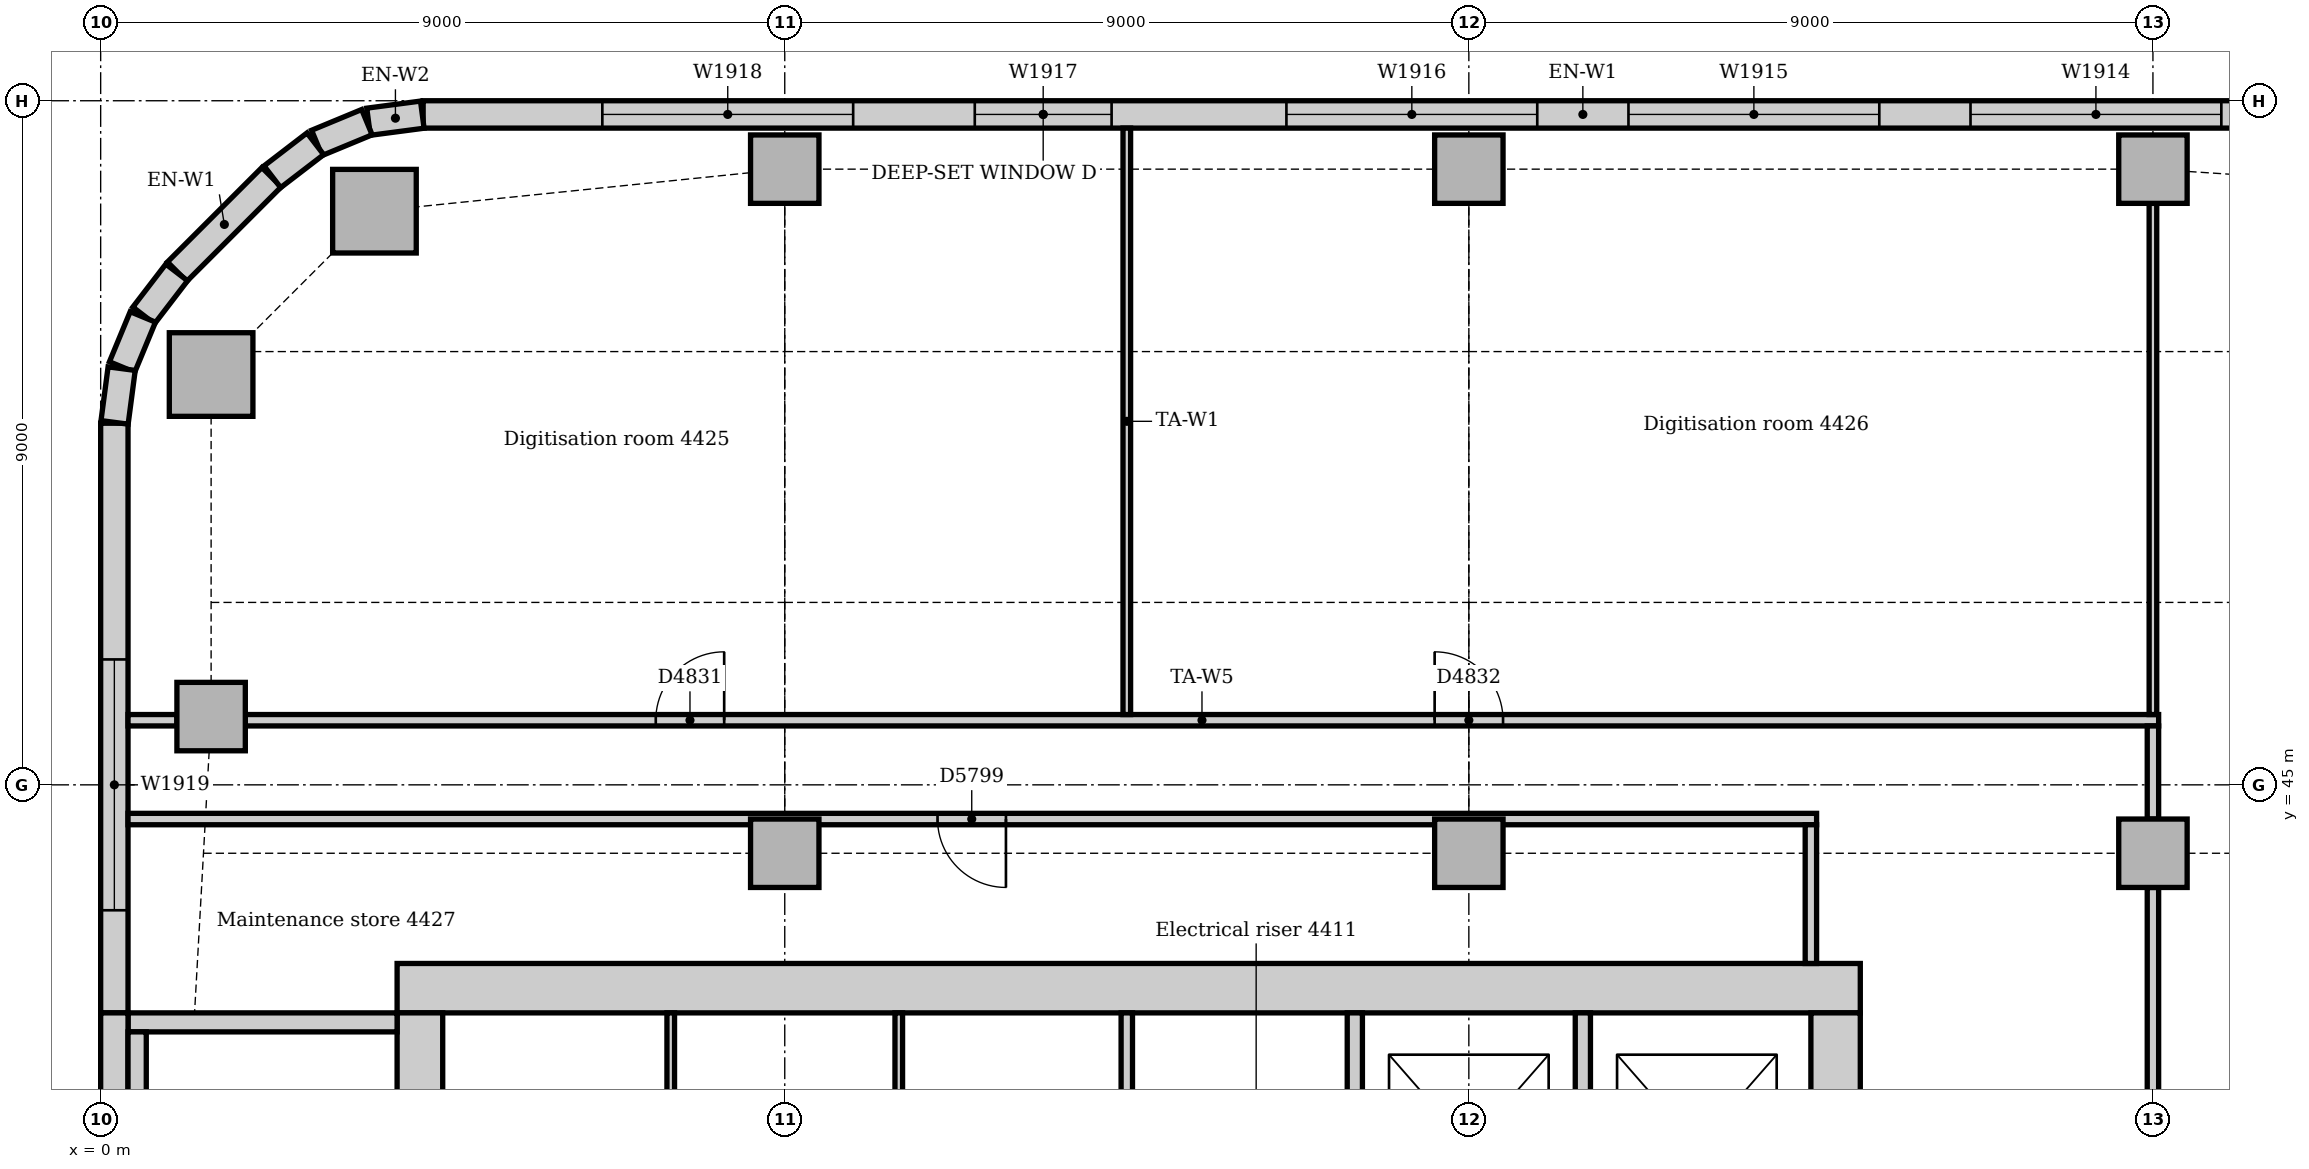
"""IFC4 building model, lengths in metres.
Left out: names, types, materials, properties, quantities, classifications, styles, units other than length and angle.
Written with IfcOpenShell. Run it as: python <this file> out.ifc"""

import sys

from ifc_helpers import new_model, si_unit, direction, frame, frame_2d, origin, origin_2d, place, context, subcontext, project, spatial, rectangle, extrude, element, fill, save


model = new_model("IFC4")
c1 = context("Model", 3, precision=1e-05, world=origin(), true_north=direction((0.0, 1.0)))
c2 = subcontext(c1, "Body", "Model", "MODEL_VIEW")
j1 = project(units=[si_unit("LENGTHUNIT", "METRE"), si_unit("PLANEANGLEUNIT", "RADIAN")], contexts=[c1])
p1 = place(None, origin())
s1 = spatial("IfcSite", under=j1, at=p1, CompositionType="ELEMENT")
p2 = place(p1, origin())
s2 = spatial("IfcBuilding", under=s1, at=p2, CompositionType="ELEMENT")
p3 = place(p2, frame((0.0, 0.0, 185.0)))
s3 = spatial("IfcBuildingStorey", under=s2, at=p3, CompositionType="ELEMENT", Elevation=185.0)
p4 = place(p3, frame((23.15, 42.325, 0.0), z_axis=(0.0, 0.0, 1.0), x_axis=(-1.0, 0.0, 0.0)))
e1 = element("IfcWall", 1, at=p4, inside=s3, PredefinedType="SOLIDWALL", context=c2, shape_type="SweptSolid", body=[
    extrude(rectangle(XDim=19.25, YDim=0.65, at=frame_2d((9.625, 0.0))), origin(), (0.0, 0.0, 1.0), 4.0),
])
p5 = place(p3, frame((22.825, 31.5, 0.0), z_axis=(0.0, 0.0, 1.0), x_axis=(0.0, 1.0, 0.0)))
e2 = element("IfcWall", 2, at=p5, inside=s3, PredefinedType="SOLIDWALL", context=c2, shape_type="SweptSolid", body=[
    extrude(rectangle(XDim=10.5, YDim=0.65, at=frame_2d((5.25, 0.0))), origin(), (0.0, 0.0, 1.0), 4.0),
])
p6 = place(p5, frame((3.15, 0.0, 0.0)))
e3 = element("IfcOpeningElement", 3, at=p6, cuts=e2, PredefinedType="OPENING", context=c2, shape_type="SweptSolid", body=[
    extrude(rectangle(XDim=1.0, YDim=2.1, at=frame_2d((0.5, 1.05))), frame((0.0, 0.335, 0.0), z_axis=(0.0, -1.0, 0.0), x_axis=(1.0, 0.0, 0.0)), (0.0, 0.0, 1.0), 0.67),
])
p7 = place(p5, frame((5.2, 0.0, 0.0)))
e4 = element("IfcOpeningElement", 4, at=p7, cuts=e2, PredefinedType="OPENING", context=c2, shape_type="SweptSolid", body=[
    extrude(rectangle(XDim=1.0, YDim=2.1, at=frame_2d((0.5, 1.05))), frame((0.0, 0.335, 0.0), z_axis=(0.0, -1.0, 0.0), x_axis=(1.0, 0.0, 0.0)), (0.0, 0.0, 1.0), 0.67),
])
p8 = place(p3, frame((4.2, 42.0, 0.0), z_axis=(0.0, 0.0, 1.0), x_axis=(0.0, -1.0, 0.0)))
e5 = element("IfcWall", 5, at=p8, inside=s3, PredefinedType="SOLIDWALL", context=c2, shape_type="SweptSolid", body=[
    extrude(rectangle(XDim=10.5, YDim=0.6, at=frame_2d((5.25, 0.0))), origin(), (0.0, 0.0, 1.0), 4.0),
])
p9 = place(p8, frame((5.3, 0.0, 0.0)))
e6 = element("IfcOpeningElement", 6, at=p9, cuts=e5, PredefinedType="OPENING", context=c2, shape_type="SweptSolid", body=[
    extrude(rectangle(XDim=1.0, YDim=2.1, at=frame_2d((0.5, 1.05))), frame((0.0, 0.31, 0.0), z_axis=(0.0, -1.0, 0.0), x_axis=(1.0, 0.0, 0.0)), (0.0, 0.0, 1.0), 0.62),
])
p10 = place(p3, frame((3.9, 41.875, 0.0), z_axis=(0.0, 0.0, 1.0), x_axis=(-1.0, 0.0, 0.0)))
e7 = element("IfcWall", 7, at=p10, inside=s3, PredefinedType="SOLIDWALL", context=c2, shape_type="SweptSolid", body=[
    extrude(rectangle(XDim=3.54, YDim=0.25, at=frame_2d((1.77, 0.0))), origin(), (0.0, 0.0, 1.0), 4.0),
])
for number, where, z_axis, x_axis in (
    (8, (3.602, 52.547, 0.0), (0.0, 0.0, 1.0), (1.0, 0.0, 0.0)),
    (9, (1.453, 50.398, 0.0), (0.0, 0.0, 1.0), (1.0, 0.0, 0.0)),
):
    element("IfcColumn", number, at=place(p3, frame(where, z_axis=z_axis, x_axis=x_axis)), inside=s3, PredefinedType="COLUMN", context=c2, shape_type="SweptSolid", body=[
        extrude(rectangle(XDim=1.1, YDim=1.1, at=origin_2d()), origin(), (0.0, 0.0, 1.0), 3.85),
    ])
for number, where, z_axis, x_axis in (
    (10, (9.0, 53.1, 0.0), (0.0, 0.0, 1.0), (1.0, 0.0, 0.0)),
    (11, (18.0, 53.1, 0.0), (0.0, 0.0, 1.0), (1.0, 0.0, 0.0)),
    (12, (27.0, 53.1, 0.0), (0.0, 0.0, 1.0), (1.0, 0.0, 0.0)),
    (13, (1.453, 45.898, 0.0), (0.0, 0.0, 1.0), (1.0, 0.0, 0.0)),
    (14, (9.0, 44.1, 0.0), (0.0, 0.0, 1.0), (1.0, 0.0, 0.0)),
    (15, (18.0, 44.1, 0.0), (0.0, 0.0, 1.0), (1.0, 0.0, 0.0)),
    (16, (27.0, 44.1, 0.0), (0.0, 0.0, 1.0), (1.0, 0.0, 0.0)),
):
    element("IfcColumn", number, at=place(p3, frame(where, z_axis=z_axis, x_axis=x_axis)), inside=s3, PredefinedType="COLUMN", context=c2, shape_type="SweptSolid", body=[
        extrude(rectangle(XDim=0.9, YDim=0.9, at=origin_2d()), origin(), (0.0, 0.0, 1.0), 3.85),
    ])
p11 = place(p3, frame((34.757, 53.82, 0.0), z_axis=(0.0, 0.0, 1.0), x_axis=(-1.0, 0.0, 0.0)))
e17 = element("IfcWall", 17, at=p11, inside=s3, PredefinedType="STANDARD", context=c2, shape_type="SweptSolid", body=[
    extrude(rectangle(XDim=30.515, YDim=0.36, at=frame_2d((15.257, 0.0))), origin(), (0.0, 0.0, 1.0), 3.85),
])
p12 = place(p11, frame((2.357, 0.0, 0.9)))
e18 = element("IfcOpeningElement", 18, at=p12, cuts=e17, PredefinedType="OPENING", context=c2, shape_type="SweptSolid", body=[
    extrude(rectangle(XDim=3.3, YDim=1.6, at=frame_2d((1.65, 0.8))), frame((0.0, 0.19, 0.0), z_axis=(0.0, -1.0, 0.0), x_axis=(1.0, 0.0, 0.0)), (0.0, 0.0, 1.0), 0.38),
])
p13 = place(p11, frame((6.857, 0.0, 0.9)))
e19 = element("IfcOpeningElement", 19, at=p13, cuts=e17, PredefinedType="OPENING", context=c2, shape_type="SweptSolid", body=[
    extrude(rectangle(XDim=3.3, YDim=1.6, at=frame_2d((1.65, 0.8))), frame((0.0, 0.19, 0.0), z_axis=(0.0, -1.0, 0.0), x_axis=(1.0, 0.0, 0.0)), (0.0, 0.0, 1.0), 0.38),
])
p14 = place(p11, frame((11.357, 0.0, 0.9)))
e20 = element("IfcOpeningElement", 20, at=p14, cuts=e17, PredefinedType="OPENING", context=c2, shape_type="SweptSolid", body=[
    extrude(rectangle(XDim=3.3, YDim=1.6, at=frame_2d((1.65, 0.8))), frame((0.0, 0.19, 0.0), z_axis=(0.0, -1.0, 0.0), x_axis=(1.0, 0.0, 0.0)), (0.0, 0.0, 1.0), 0.38),
])
p15 = place(p11, frame((15.857, 0.0, 0.9)))
e21 = element("IfcOpeningElement", 21, at=p15, cuts=e17, PredefinedType="OPENING", context=c2, shape_type="SweptSolid", body=[
    extrude(rectangle(XDim=3.3, YDim=1.6, at=frame_2d((1.65, 0.8))), frame((0.0, 0.19, 0.0), z_axis=(0.0, -1.0, 0.0), x_axis=(1.0, 0.0, 0.0)), (0.0, 0.0, 1.0), 0.38),
])
p16 = place(p11, frame((21.457, 0.0, 0.9)))
e22 = element("IfcOpeningElement", 22, at=p16, cuts=e17, PredefinedType="OPENING", context=c2, shape_type="SweptSolid", body=[
    extrude(rectangle(XDim=1.8, YDim=1.6, at=frame_2d((0.9, 0.8))), frame((0.0, 0.19, 0.0), z_axis=(0.0, -1.0, 0.0), x_axis=(1.0, 0.0, 0.0)), (0.0, 0.0, 1.0), 0.38),
])
p17 = place(p11, frame((24.857, 0.0, 0.9)))
e23 = element("IfcOpeningElement", 23, at=p17, cuts=e17, PredefinedType="OPENING", context=c2, shape_type="SweptSolid", body=[
    extrude(rectangle(XDim=3.3, YDim=1.6, at=frame_2d((1.65, 0.8))), frame((0.0, 0.19, 0.0), z_axis=(0.0, -1.0, 0.0), x_axis=(1.0, 0.0, 0.0)), (0.0, 0.0, 1.0), 0.38),
])
p18 = place(p3, frame((2.249, 52.994, 0.0), z_axis=(0.0, 0.0, 1.0), x_axis=(-0.707106781187, -0.707106781187, 0.0)))
e24 = element("IfcWall", 24, at=p18, inside=s3, PredefinedType="STANDARD", context=c2, shape_type="SweptSolid", body=[
    extrude(rectangle(XDim=1.757, YDim=0.36, at=frame_2d((0.879, 0.0))), origin(), (0.0, 0.0, 1.0), 3.85),
])
p19 = place(p3, frame((0.18, 49.757, 0.0), z_axis=(0.0, 0.0, 1.0), x_axis=(0.0, -1.0, 0.0)))
e25 = element("IfcWall", 25, at=p19, inside=s3, PredefinedType="STANDARD", context=c2, shape_type="SweptSolid", body=[
    extrude(rectangle(XDim=7.757, YDim=0.36, at=frame_2d((3.879, 0.0))), origin(), (0.0, 0.0, 1.0), 3.85),
])
p20 = place(p19, frame((3.107, 0.0, 0.9)))
e26 = element("IfcOpeningElement", 26, at=p20, cuts=e25, PredefinedType="OPENING", context=c2, shape_type="SweptSolid", body=[
    extrude(rectangle(XDim=3.3, YDim=1.6, at=frame_2d((1.65, 0.8))), frame((0.0, 0.19, 0.0), z_axis=(0.0, -1.0, 0.0), x_axis=(1.0, 0.0, 0.0)), (0.0, 0.0, 1.0), 0.38),
])
p21 = place(p3, frame((0.18, 42.0, 0.0), z_axis=(0.0, 0.0, 1.0), x_axis=(0.0, -1.0, 0.0)))
e27 = element("IfcWall", 27, at=p21, inside=s3, PredefinedType="STANDARD", context=c2, shape_type="SweptSolid", body=[
    extrude(rectangle(XDim=6.75, YDim=0.36, at=frame_2d((3.375, 0.0))), origin(), (0.0, 0.0, 1.0), 3.85),
])
for number, where, z_axis, x_axis in (
    (28, (4.231, 53.817, 0.0), (0.0, 0.0, 1.0), (-0.991, -0.131, 0.0)),
    (29, (3.503, 53.718, 0.0), (0.0, 0.0, 1.0), (-0.924, -0.383, 0.0)),
):
    element("IfcWall", number, at=place(p3, frame(where, z_axis=z_axis, x_axis=x_axis)), inside=s3, PredefinedType="STANDARD", context=c2, shape_type="SweptSolid", body=[
        extrude(rectangle(XDim=0.713, YDim=0.36, at=frame_2d((0.356, 0.0))), origin(), (0.0, 0.0, 1.0), 3.85),
    ])
for number, where, z_axis, x_axis in (
    (30, (2.825, 53.434, 0.0), (0.0, 0.0, 1.0), (-0.793, -0.609, 0.0)),
    (31, (1.0, 51.741, 0.0), (0.0, 0.0, 1.0), (-0.609, -0.793, 0.0)),
):
    element("IfcWall", number, at=place(p3, frame(where, z_axis=z_axis, x_axis=x_axis)), inside=s3, PredefinedType="STANDARD", context=c2, shape_type="SweptSolid", body=[
        extrude(rectangle(XDim=0.713, YDim=0.36, at=frame_2d((0.357, 0.0))), origin(), (0.0, 0.0, 1.0), 3.85),
    ])
for number, where, z_axis, x_axis in (
    (32, (0.555, 51.156, 0.0), (0.0, 0.0, 1.0), (-0.383, -0.924, 0.0)),
    (33, (0.276, 50.476, 0.0), (0.0, 0.0, 1.0), (-0.131, -0.991, 0.0)),
):
    element("IfcWall", number, at=place(p3, frame(where, z_axis=z_axis, x_axis=x_axis)), inside=s3, PredefinedType="STANDARD", context=c2, shape_type="SweptSolid", body=[
        extrude(rectangle(XDim=0.713, YDim=0.36, at=frame_2d((0.356, 0.0))), origin(), (0.0, 0.0, 1.0), 3.85),
    ])
p22 = place(p3, frame((0.48, 40.13, 0.0), z_axis=(0.0, 0.0, 1.0), x_axis=(0.0, 1.0, 0.0)))
e34 = element("IfcWall", 34, at=p22, inside=s3, PredefinedType="STANDARD", context=c2, shape_type="SweptSolid", body=[
    extrude(rectangle(XDim=1.62, YDim=0.24, at=frame_2d((0.81, 0.0))), origin(), (0.0, 0.0, 1.0), 4.0),
])
for number, where, z_axis, x_axis in (
    (35, (16.5, 38.6, 0.0), (0.0, 0.0, 1.0), (0.0, 1.0, 0.0)),
    (36, (19.5, 38.6, 0.0), (0.0, 0.0, 1.0), (0.0, 1.0, 0.0)),
):
    element("IfcWall", number, at=place(p3, frame(where, z_axis=z_axis, x_axis=x_axis)), inside=s3, PredefinedType="PARTITIONING", context=c2, shape_type="SweptSolid", body=[
        extrude(rectangle(XDim=3.4, YDim=0.2, at=frame_2d((1.7, 0.0))), origin(), (0.0, 0.0, 1.0), 3.85),
    ])
p23 = place(p3, frame((1.903, 45.85, 0.0), z_axis=(0.0, 0.0, 1.0), x_axis=(1.0, 0.0, 0.0)))
e37 = element("IfcWall", 37, at=p23, inside=s3, PredefinedType="PARTITIONING", context=c2, shape_type="SweptSolid", body=[
    extrude(rectangle(XDim=25.172, YDim=0.15, at=frame_2d((12.586, 0.0))), origin(), (0.0, 0.0, 1.0), 3.85),
])
p24 = place(p23, frame((5.4, 0.0, 0.0)))
e38 = element("IfcOpeningElement", 38, at=p24, cuts=e37, PredefinedType="OPENING", context=c2, shape_type="SweptSolid", body=[
    extrude(rectangle(XDim=0.9, YDim=2.1, at=frame_2d((0.45, 1.05))), frame((0.0, 0.085, 0.0), z_axis=(0.0, -1.0, 0.0), x_axis=(1.0, 0.0, 0.0)), (0.0, 0.0, 1.0), 0.17),
])
p25 = place(p23, frame((15.647, 0.0, 0.0)))
e39 = element("IfcOpeningElement", 39, at=p25, cuts=e37, PredefinedType="OPENING", context=c2, shape_type="SweptSolid", body=[
    extrude(rectangle(XDim=0.9, YDim=2.1, at=frame_2d((0.45, 1.05))), frame((0.0, 0.085, 0.0), z_axis=(0.0, -1.0, 0.0), x_axis=(1.0, 0.0, 0.0)), (0.0, 0.0, 1.0), 0.17),
])
p26 = place(p3, frame((0.36, 45.85, 0.0), z_axis=(0.0, 0.0, 1.0), x_axis=(1.0, 0.0, 0.0)))
e40 = element("IfcWall", 40, at=p26, inside=s3, PredefinedType="PARTITIONING", context=c2, shape_type="SweptSolid", body=[
    extrude(rectangle(XDim=0.643, YDim=0.15, at=frame_2d((0.322, 0.0))), origin(), (0.0, 0.0, 1.0), 3.85),
])
p27 = place(p3, frame((0.36, 44.55, 0.0), z_axis=(0.0, 0.0, 1.0), x_axis=(1.0, 0.0, 0.0)))
e41 = element("IfcWall", 41, at=p27, inside=s3, PredefinedType="PARTITIONING", context=c2, shape_type="SweptSolid", body=[
    extrude(rectangle(XDim=22.215, YDim=0.15, at=frame_2d((11.107, 0.0))), origin(), (0.0, 0.0, 1.0), 3.85),
])
p28 = place(p27, frame((10.65, 0.0, 0.0)))
e42 = element("IfcOpeningElement", 42, at=p28, cuts=e41, PredefinedType="OPENING", context=c2, shape_type="SweptSolid", body=[
    extrude(rectangle(XDim=0.9, YDim=2.1, at=frame_2d((0.45, 1.05))), frame((0.0, 0.085, 0.0), z_axis=(0.0, -1.0, 0.0), x_axis=(1.0, 0.0, 0.0)), (0.0, 0.0, 1.0), 0.17),
])
p29 = place(p3, frame((27.0, 36.45, 0.0), z_axis=(0.0, 0.0, 1.0), x_axis=(0.0, 1.0, 0.0)))
e43 = element("IfcWall", 43, at=p29, inside=s3, PredefinedType="PARTITIONING", context=c2, shape_type="SweptSolid", body=[
    extrude(rectangle(XDim=7.2, YDim=0.15, at=frame_2d((3.6, 0.0))), origin(), (0.0, 0.0, 1.0), 3.362),
])
p30 = place(p3, frame((27.0, 44.55, 0.0), z_axis=(0.0, 0.0, 1.0), x_axis=(0.0, 1.0, 0.0)))
e44 = element("IfcWall", 44, at=p30, inside=s3, PredefinedType="PARTITIONING", context=c2, shape_type="SweptSolid", body=[
    extrude(rectangle(XDim=1.225, YDim=0.15, at=frame_2d((0.613, 0.0))), origin(), (0.0, 0.0, 1.0), 3.362),
])
p31 = place(p3, frame((22.5, 42.65, 0.0), z_axis=(0.0, 0.0, 1.0), x_axis=(0.0, 1.0, 0.0)))
e45 = element("IfcWall", 45, at=p31, inside=s3, PredefinedType="PARTITIONING", context=c2, shape_type="SweptSolid", body=[
    extrude(rectangle(XDim=1.825, YDim=0.15, at=frame_2d((0.912, 0.0))), origin(), (0.0, 0.0, 1.0), 3.85),
])
p32 = place(p3, frame((13.5, 38.575, 0.0), z_axis=(0.0, 0.0, 1.0), x_axis=(0.0, 1.0, 0.0)))
e46 = element("IfcWall", 46, at=p32, inside=s3, PredefinedType="PARTITIONING", context=c2, shape_type="SweptSolid", body=[
    extrude(rectangle(XDim=3.425, YDim=0.15, at=frame_2d((1.712, 0.0))), origin(), (0.0, 0.0, 1.0), 3.85),
])
p33 = place(p3, frame((13.5, 45.925, 0.0), z_axis=(0.0, 0.0, 1.0), x_axis=(0.0, 1.0, 0.0)))
e47 = element("IfcWall", 47, at=p33, inside=s3, PredefinedType="PARTITIONING", context=c2, shape_type="SweptSolid", body=[
    extrude(rectangle(XDim=7.715, YDim=0.1, at=frame_2d((3.857, 0.0))), origin(), (0.0, 0.0, 1.0), 3.85),
])
p34 = place(p3, frame((27.0, 45.925, 0.0), z_axis=(0.0, 0.0, 1.0), x_axis=(0.0, 1.0, 0.0)))
e48 = element("IfcWall", 48, at=p34, inside=s3, PredefinedType="PARTITIONING", context=c2, shape_type="SweptSolid", body=[
    extrude(rectangle(XDim=6.725, YDim=0.1, at=frame_2d((3.362, 0.0))), origin(), (0.0, 0.0, 1.0), 3.362),
])
for number, where, z_axis, x_axis in (
    (49, (7.5, 38.575, 0.0), (0.0, 0.0, 1.0), (0.0, 1.0, 0.0)),
    (50, (10.5, 38.575, 0.0), (0.0, 0.0, 1.0), (0.0, 1.0, 0.0)),
):
    element("IfcWall", number, at=place(p3, frame(where, z_axis=z_axis, x_axis=x_axis)), inside=s3, PredefinedType="PARTITIONING", context=c2, shape_type="SweptSolid", body=[
        extrude(rectangle(XDim=3.425, YDim=0.1, at=frame_2d((1.712, 0.0))), origin(), (0.0, 0.0, 1.0), 3.85),
    ])
p35 = place(p13, origin())
e51 = element("IfcWindow", 51, at=p35, inside=s3, PartitioningType="SINGLE_PANEL", PredefinedType="WINDOW", context=c2, shape_type="SweptSolid", body=[
    extrude(rectangle(XDim=3.3, YDim=1.6, at=frame_2d((1.65, 0.8))), frame((0.0, 0.13, 0.0), z_axis=(0.0, -1.0, 0.0), x_axis=(1.0, 0.0, 0.0)), (0.0, 0.0, 1.0), 0.06),
])
fill(e19, e51)
p36 = place(p14, origin())
e52 = element("IfcWindow", 52, at=p36, inside=s3, PartitioningType="SINGLE_PANEL", PredefinedType="WINDOW", context=c2, shape_type="SweptSolid", body=[
    extrude(rectangle(XDim=3.3, YDim=1.6, at=frame_2d((1.65, 0.8))), frame((0.0, 0.13, 0.0), z_axis=(0.0, -1.0, 0.0), x_axis=(1.0, 0.0, 0.0)), (0.0, 0.0, 1.0), 0.06),
])
fill(e20, e52)
p37 = place(p15, origin())
e53 = element("IfcWindow", 53, at=p37, inside=s3, PartitioningType="SINGLE_PANEL", PredefinedType="WINDOW", context=c2, shape_type="SweptSolid", body=[
    extrude(rectangle(XDim=3.3, YDim=1.6, at=frame_2d((1.65, 0.8))), frame((0.0, 0.13, 0.0), z_axis=(0.0, -1.0, 0.0), x_axis=(1.0, 0.0, 0.0)), (0.0, 0.0, 1.0), 0.06),
])
fill(e21, e53)
p38 = place(p16, origin())
e54 = element("IfcWindow", 54, at=p38, inside=s3, PartitioningType="SINGLE_PANEL", PredefinedType="WINDOW", context=c2, shape_type="SweptSolid", body=[
    extrude(rectangle(XDim=1.8, YDim=1.6, at=frame_2d((0.9, 0.8))), frame((0.0, 0.13, 0.0), z_axis=(0.0, -1.0, 0.0), x_axis=(1.0, 0.0, 0.0)), (0.0, 0.0, 1.0), 0.06),
])
fill(e22, e54)
p39 = place(p17, origin())
e55 = element("IfcWindow", 55, at=p39, inside=s3, PartitioningType="SINGLE_PANEL", PredefinedType="WINDOW", context=c2, shape_type="SweptSolid", body=[
    extrude(rectangle(XDim=3.3, YDim=1.6, at=frame_2d((1.65, 0.8))), frame((0.0, 0.13, 0.0), z_axis=(0.0, -1.0, 0.0), x_axis=(1.0, 0.0, 0.0)), (0.0, 0.0, 1.0), 0.06),
])
fill(e23, e55)
p40 = place(p20, origin())
e56 = element("IfcWindow", 56, at=p40, inside=s3, PartitioningType="SINGLE_PANEL", PredefinedType="WINDOW", context=c2, shape_type="SweptSolid", body=[
    extrude(rectangle(XDim=3.3, YDim=1.6, at=frame_2d((1.65, 0.8))), frame((0.0, 0.13, 0.0), z_axis=(0.0, -1.0, 0.0), x_axis=(1.0, 0.0, 0.0)), (0.0, 0.0, 1.0), 0.06),
])
fill(e26, e56)
p41 = place(p24, origin())
e57 = element("IfcDoor", 57, at=p41, inside=s3, OperationType="SINGLE_SWING_RIGHT", PredefinedType="DOOR", context=c2, shape_type="SweptSolid", body=[
    extrude(rectangle(XDim=0.9, YDim=2.1, at=frame_2d((0.45, 1.05))), frame((0.0, 0.025, 0.0), z_axis=(0.0, -1.0, 0.0), x_axis=(1.0, 0.0, 0.0)), (0.0, 0.0, 1.0), 0.05),
])
fill(e38, e57)
p42 = place(p25, origin())
e58 = element("IfcDoor", 58, at=p42, inside=s3, OperationType="SINGLE_SWING_LEFT", PredefinedType="DOOR", context=c2, shape_type="SweptSolid", body=[
    extrude(rectangle(XDim=0.9, YDim=2.1, at=frame_2d((0.45, 1.05))), frame((0.0, 0.025, 0.0), z_axis=(0.0, -1.0, 0.0), x_axis=(1.0, 0.0, 0.0)), (0.0, 0.0, 1.0), 0.05),
])
fill(e39, e58)
p43 = place(p28, frame((0.9, 0.0, 0.0), z_axis=(0.0, 0.0, 1.0), x_axis=(-1.0, 0.0, 0.0)))
e59 = element("IfcDoor", 59, at=p43, inside=s3, OperationType="SINGLE_SWING_LEFT", PredefinedType="DOOR", context=c2, shape_type="SweptSolid", body=[
    extrude(rectangle(XDim=0.9, YDim=2.1, at=frame_2d((0.45, 1.05))), frame((0.0, 0.025, 0.0), z_axis=(0.0, -1.0, 0.0), x_axis=(1.0, 0.0, 0.0)), (0.0, 0.0, 1.0), 0.05),
])
fill(e42, e59)
save(model, sys.argv[1])
